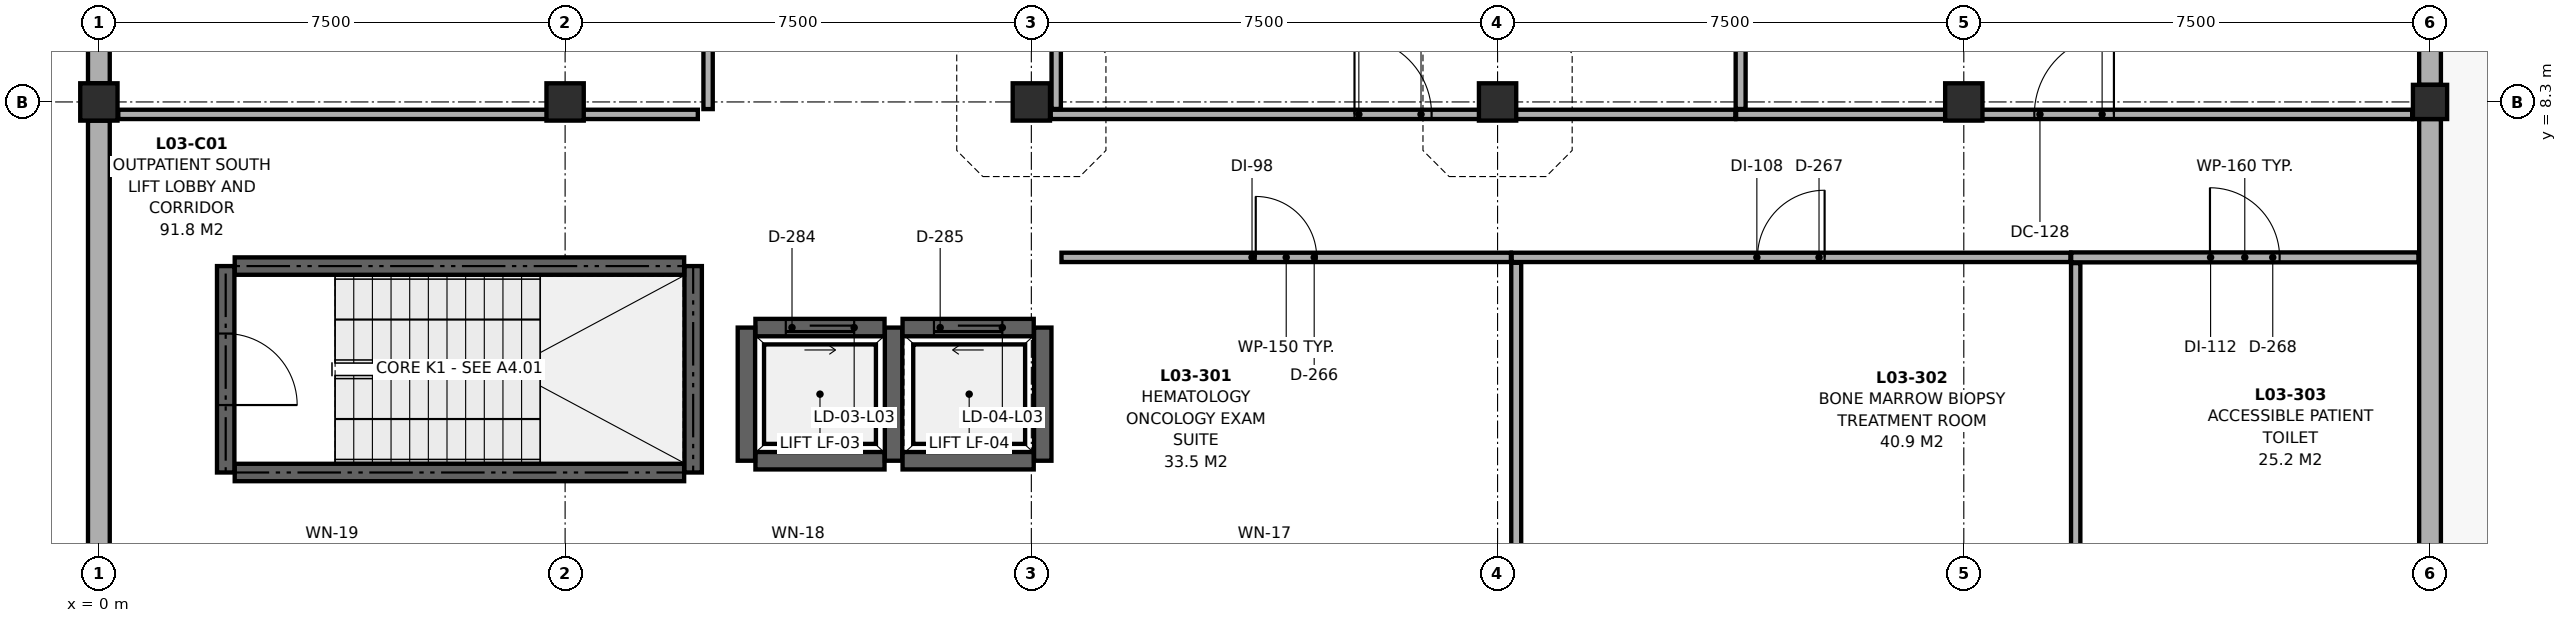
"""IFC4 building model, lengths in metres.
Left out: names, types, materials, properties, quantities, classifications, styles, units other than length and angle.
Written with IfcOpenShell. Run it as: python <this file> out.ifc"""

import sys

from ifc_helpers import new_model, si_unit, direction, frame, frame_2d, origin, origin_2d, place, context, subcontext, project, spatial, rectangle, extrude, element, fill, save


model = new_model("IFC4")
c1 = context("Model", 3, precision=1e-05, world=origin(), true_north=direction((0.0, 1.0)))
c2 = subcontext(c1, "Body", "Model", "MODEL_VIEW")
j1 = project(units=[si_unit("LENGTHUNIT", "METRE"), si_unit("PLANEANGLEUNIT", "RADIAN")], contexts=[c1])
p1 = place(None, origin())
s1 = spatial("IfcSite", under=j1, at=p1, CompositionType="ELEMENT")
p2 = place(p1, origin())
s2 = spatial("IfcBuilding", under=s1, at=p2, CompositionType="ELEMENT")
p3 = place(p2, frame((0.0, 0.0, 13.5)))
s3 = spatial("IfcBuildingStorey", under=s2, at=p3, CompositionType="ELEMENT", Elevation=13.5)
for number, where, z_axis, x_axis in (
    (1, (0.0, 8.3, 0.0), (0.0, 0.0, 1.0), (1.0, 0.0, 0.0)),
    (2, (7.5, 8.3, 0.0), (0.0, 0.0, 1.0), (1.0, 0.0, 0.0)),
    (3, (15.0, 8.3, 0.0), (0.0, 0.0, 1.0), (1.0, 0.0, 0.0)),
    (4, (22.5, 8.3, 0.0), (0.0, 0.0, 1.0), (1.0, 0.0, 0.0)),
    (5, (30.0, 8.3, 0.0), (0.0, 0.0, 1.0), (1.0, 0.0, 0.0)),
):
    element("IfcColumn", number, at=place(p3, frame(where, z_axis=z_axis, x_axis=x_axis)), inside=s3, PredefinedType="COLUMN", context=c2, shape_type="SweptSolid", body=[
        extrude(rectangle(XDim=0.6, YDim=0.6, at=origin_2d()), origin(), (0.0, 0.0, 1.0), 3.72),
    ])
p4 = place(p3, frame((37.5, 8.3, 0.0), z_axis=(0.0, 0.0, 1.0), x_axis=(1.0, 0.0, 0.0)))
e6 = element("IfcColumn", 6, at=p4, inside=s3, PredefinedType="COLUMN", context=c2, shape_type="SweptSolid", body=[
    extrude(rectangle(XDim=0.55, YDim=0.55, at=origin_2d()), origin(), (0.0, 0.0, 1.0), 3.75),
])
p5 = place(p3, frame((37.5, 15.525, 0.0), z_axis=(0.0, 0.0, 1.0), x_axis=(0.0, -1.0, 0.0)))
e7 = element("IfcWall", 7, at=p5, inside=s3, PredefinedType="SOLIDWALL", context=c2, shape_type="SweptSolid", body=[
    extrude(rectangle(XDim=6.95, YDim=0.35, at=frame_2d((3.475, 0.0))), origin(), (0.0, 0.0, 1.0), 3.005),
])
p6 = place(p5, frame((2.925, 0.0, 0.0)))
e8 = element("IfcOpeningElement", 8, at=p6, cuts=e7, PredefinedType="OPENING", context=c2, shape_type="SweptSolid", body=[
    extrude(rectangle(XDim=1.1, YDim=2.15, at=frame_2d((0.55, 1.075))), frame((0.0, 0.187, 0.0), z_axis=(0.0, -1.0, 0.0), x_axis=(1.0, 0.0, 0.0)), (0.0, 0.0, 1.0), 0.374),
])
p7 = place(p3, frame((37.5, 8.025, 0.0), z_axis=(0.0, 0.0, 1.0), x_axis=(0.0, -1.0, 0.0)))
e9 = element("IfcWall", 9, at=p7, inside=s3, PredefinedType="SOLIDWALL", context=c2, shape_type="SweptSolid", body=[
    extrude(rectangle(XDim=6.95, YDim=0.35, at=frame_2d((3.475, 0.0))), origin(), (0.0, 0.0, 1.0), 3.005),
])
p8 = place(p3, frame((0.0, 1.1, 0.0), z_axis=(0.0, 0.0, 1.0), x_axis=(0.0, 1.0, 0.0)))
e10 = element("IfcWall", 10, at=p8, inside=s3, PredefinedType="SOLIDWALL", context=c2, shape_type="SweptSolid", body=[
    extrude(rectangle(XDim=6.9, YDim=0.35, at=frame_2d((3.45, 0.0))), origin(), (0.0, 0.0, 1.0), 3.005),
])
p9 = place(p3, frame((0.0, 8.6, 0.0), z_axis=(0.0, 0.0, 1.0), x_axis=(0.0, 1.0, 0.0)))
e11 = element("IfcWall", 11, at=p9, inside=s3, PredefinedType="SOLIDWALL", context=c2, shape_type="SweptSolid", body=[
    extrude(rectangle(XDim=6.9, YDim=0.35, at=frame_2d((3.45, 0.0))), origin(), (0.0, 0.0, 1.0), 2.805),
])
p10 = place(p3, frame((2.185, 2.34, 0.0), z_axis=(0.0, 0.0, 1.0), x_axis=(1.0, 0.0, 0.0)))
e12 = element("IfcWall", 12, at=p10, inside=s3, PredefinedType="SHEAR", context=c2, shape_type="SweptSolid", body=[
    extrude(rectangle(XDim=7.23, YDim=0.28, at=frame_2d((3.615, 0.0))), origin(), (0.0, 0.0, 1.0), 3.72),
])
p11 = place(p3, frame((9.56, 2.34, 0.0), z_axis=(0.0, 0.0, 1.0), x_axis=(0.0, 1.0, 0.0)))
e13 = element("IfcWall", 13, at=p11, inside=s3, PredefinedType="SHEAR", context=c2, shape_type="SweptSolid", body=[
    extrude(rectangle(XDim=3.32, YDim=0.28, at=frame_2d((1.66, 0.0))), origin(), (0.0, 0.0, 1.0), 3.72),
])
p12 = place(p3, frame((9.415, 5.66, 0.0), z_axis=(0.0, 0.0, 1.0), x_axis=(-1.0, 0.0, 0.0)))
e14 = element("IfcWall", 14, at=p12, inside=s3, PredefinedType="SHEAR", context=c2, shape_type="SweptSolid", body=[
    extrude(rectangle(XDim=7.23, YDim=0.28, at=frame_2d((3.615, 0.0))), origin(), (0.0, 0.0, 1.0), 3.72),
])
p13 = place(p3, frame((2.04, 5.66, 0.0), z_axis=(0.0, 0.0, 1.0), x_axis=(0.0, -1.0, 0.0)))
e15 = element("IfcWall", 15, at=p13, inside=s3, PredefinedType="SHEAR", context=c2, shape_type="SweptSolid", body=[
    extrude(rectangle(XDim=3.32, YDim=0.28, at=frame_2d((1.66, 0.0))), origin(), (0.0, 0.0, 1.0), 3.72),
])
p14 = place(p13, frame((1.085, 0.0, 0.0)))
e16 = element("IfcOpeningElement", 16, at=p14, cuts=e15, PredefinedType="OPENING", context=c2, shape_type="SweptSolid", body=[
    extrude(rectangle(XDim=1.15, YDim=2.15, at=frame_2d((0.575, 1.075))), frame((0.0, 0.152, 0.0), z_axis=(0.0, -1.0, 0.0), x_axis=(1.0, 0.0, 0.0)), (0.0, 0.0, 1.0), 0.304),
])
p15 = place(p3, frame((10.562, 2.529, 0.0), z_axis=(0.0, 0.0, 1.0), x_axis=(1.0, 0.0, 0.0)))
e17 = element("IfcWall", 17, at=p15, inside=s3, PredefinedType="SHEAR", context=c2, shape_type="SweptSolid", body=[
    extrude(rectangle(XDim=2.077, YDim=0.28, at=frame_2d((1.039, 0.0))), origin(), (0.0, 0.0, 1.0), 3.72),
])
p16 = place(p3, frame((12.783, 2.529, 0.0), z_axis=(0.0, 0.0, 1.0), x_axis=(0.0, 1.0, 0.0)))
e18 = element("IfcWall", 18, at=p16, inside=s3, PredefinedType="SHEAR", context=c2, shape_type="SweptSolid", body=[
    extrude(rectangle(XDim=2.141, YDim=0.28, at=frame_2d((1.071, 0.0))), origin(), (0.0, 0.0, 1.0), 3.72),
])
p17 = place(p3, frame((12.638, 4.671, 0.0), z_axis=(0.0, 0.0, 1.0), x_axis=(-1.0, 0.0, 0.0)))
e19 = element("IfcWall", 19, at=p17, inside=s3, PredefinedType="SHEAR", context=c2, shape_type="SweptSolid", body=[
    extrude(rectangle(XDim=2.077, YDim=0.28, at=frame_2d((1.039, 0.0))), origin(), (0.0, 0.0, 1.0), 3.72),
])
p18 = place(p17, frame((0.489, 0.0, 0.0)))
e20 = element("IfcOpeningElement", 20, at=p18, cuts=e19, PredefinedType="OPENING", context=c2, shape_type="SweptSolid", body=[
    extrude(rectangle(XDim=1.1, YDim=2.15, at=frame_2d((0.55, 1.075))), frame((0.0, 0.152, 0.0), z_axis=(0.0, -1.0, 0.0), x_axis=(1.0, 0.0, 0.0)), (0.0, 0.0, 1.0), 0.304),
])
p19 = place(p3, frame((10.417, 4.671, 0.0), z_axis=(0.0, 0.0, 1.0), x_axis=(0.0, -1.0, 0.0)))
e21 = element("IfcWall", 21, at=p19, inside=s3, PredefinedType="SHEAR", context=c2, shape_type="SweptSolid", body=[
    extrude(rectangle(XDim=2.141, YDim=0.28, at=frame_2d((1.071, 0.0))), origin(), (0.0, 0.0, 1.0), 3.72),
])
p20 = place(p3, frame((12.928, 2.529, 0.0), z_axis=(0.0, 0.0, 1.0), x_axis=(1.0, 0.0, 0.0)))
e22 = element("IfcWall", 22, at=p20, inside=s3, PredefinedType="SHEAR", context=c2, shape_type="SweptSolid", body=[
    extrude(rectangle(XDim=2.11, YDim=0.28, at=frame_2d((1.055, 0.0))), origin(), (0.0, 0.0, 1.0), 3.72),
])
p21 = place(p3, frame((15.184, 2.529, 0.0), z_axis=(0.0, 0.0, 1.0), x_axis=(0.0, 1.0, 0.0)))
e23 = element("IfcWall", 23, at=p21, inside=s3, PredefinedType="SHEAR", context=c2, shape_type="SweptSolid", body=[
    extrude(rectangle(XDim=2.141, YDim=0.28, at=frame_2d((1.071, 0.0))), origin(), (0.0, 0.0, 1.0), 3.72),
])
p22 = place(p3, frame((15.039, 4.671, 0.0), z_axis=(0.0, 0.0, 1.0), x_axis=(-1.0, 0.0, 0.0)))
e24 = element("IfcWall", 24, at=p22, inside=s3, PredefinedType="SHEAR", context=c2, shape_type="SweptSolid", body=[
    extrude(rectangle(XDim=2.11, YDim=0.28, at=frame_2d((1.055, 0.0))), origin(), (0.0, 0.0, 1.0), 3.72),
])
p23 = place(p22, frame((0.505, 0.0, 0.0)))
e25 = element("IfcOpeningElement", 25, at=p23, cuts=e24, PredefinedType="OPENING", context=c2, shape_type="SweptSolid", body=[
    extrude(rectangle(XDim=1.1, YDim=2.15, at=frame_2d((0.55, 1.075))), frame((0.0, 0.152, 0.0), z_axis=(0.0, -1.0, 0.0), x_axis=(1.0, 0.0, 0.0)), (0.0, 0.0, 1.0), 0.304),
])
p24 = place(p3, frame((15.485, 5.8, 0.0), z_axis=(0.0, 0.0, 1.0), x_axis=(1.0, 0.0, 0.0)))
e26 = element("IfcWall", 26, at=p24, inside=s3, PredefinedType="PARTITIONING", context=c2, shape_type="SweptSolid", body=[
    extrude(rectangle(XDim=7.23, YDim=0.15, at=frame_2d((3.615, 0.0))), origin(), (0.0, 0.0, 1.0), 2.805),
])
p25 = place(p24, frame((3.125, 0.0, 0.0)))
e27 = element("IfcOpeningElement", 27, at=p25, cuts=e26, PredefinedType="OPENING", context=c2, shape_type="SweptSolid", body=[
    extrude(rectangle(XDim=0.98, YDim=2.12, at=frame_2d((0.49, 1.06))), frame((0.0, 0.087, 0.0), z_axis=(0.0, -1.0, 0.0), x_axis=(1.0, 0.0, 0.0)), (0.0, 0.0, 1.0), 0.174),
])
p26 = place(p3, frame((22.727, 5.8, 0.0), z_axis=(0.0, 0.0, 1.0), x_axis=(1.0, 0.0, 0.0)))
e28 = element("IfcWall", 28, at=p26, inside=s3, PredefinedType="PARTITIONING", context=c2, shape_type="SweptSolid", body=[
    extrude(rectangle(XDim=8.988, YDim=0.15, at=frame_2d((4.494, 0.0))), origin(), (0.0, 0.0, 1.0), 2.805),
])
p27 = place(p26, frame((3.954, 0.0, 0.0)))
e29 = element("IfcOpeningElement", 29, at=p27, cuts=e28, PredefinedType="OPENING", context=c2, shape_type="SweptSolid", body=[
    extrude(rectangle(XDim=1.08, YDim=2.18, at=frame_2d((0.54, 1.09))), frame((0.0, 0.087, 0.0), z_axis=(0.0, -1.0, 0.0), x_axis=(1.0, 0.0, 0.0)), (0.0, 0.0, 1.0), 0.174),
])
p28 = place(p3, frame((31.727, 5.8, 0.0), z_axis=(0.0, 0.0, 1.0), x_axis=(1.0, 0.0, 0.0)))
e30 = element("IfcWall", 30, at=p28, inside=s3, PredefinedType="PARTITIONING", context=c2, shape_type="SweptSolid", body=[
    extrude(rectangle(XDim=5.586, YDim=0.16, at=frame_2d((2.793, 0.0))), origin(), (0.0, 0.0, 1.0), 3.085),
])
p29 = place(p28, frame((2.233, 0.0, 0.0)))
e31 = element("IfcOpeningElement", 31, at=p29, cuts=e30, PredefinedType="OPENING", context=c2, shape_type="SweptSolid", body=[
    extrude(rectangle(XDim=1.12, YDim=2.2, at=frame_2d((0.56, 1.1))), frame((0.0, 0.092, 0.0), z_axis=(0.0, -1.0, 0.0), x_axis=(1.0, 0.0, 0.0)), (0.0, 0.0, 1.0), 0.184),
])
p30 = place(p3, frame((15.312, 8.1, 0.0), z_axis=(0.0, 0.0, 1.0), x_axis=(1.0, 0.0, 0.0)))
e32 = element("IfcWall", 32, at=p30, inside=s3, PredefinedType="PARTITIONING", context=c2, shape_type="SweptSolid", body=[
    extrude(rectangle(XDim=11.013, YDim=0.15, at=frame_2d((5.506, 0.0))), origin(), (0.0, 0.0, 1.0), 2.805),
])
p31 = place(p30, frame((4.886, 0.0, 0.0)))
e33 = element("IfcOpeningElement", 33, at=p31, cuts=e32, PredefinedType="OPENING", context=c2, shape_type="SweptSolid", body=[
    extrude(rectangle(XDim=1.24, YDim=2.2, at=frame_2d((0.62, 1.1))), frame((0.0, 0.087, 0.0), z_axis=(0.0, -1.0, 0.0), x_axis=(1.0, 0.0, 0.0)), (0.0, 0.0, 1.0), 0.174),
])
p32 = place(p3, frame((26.337, 8.1, 0.0), z_axis=(0.0, 0.0, 1.0), x_axis=(1.0, 0.0, 0.0)))
e34 = element("IfcWall", 34, at=p32, inside=s3, PredefinedType="PARTITIONING", context=c2, shape_type="SweptSolid", body=[
    extrude(rectangle(XDim=10.876, YDim=0.15, at=frame_2d((5.438, 0.0))), origin(), (0.0, 0.0, 1.0), 2.805),
])
p33 = place(p32, frame((4.798, 0.0, 0.0)))
e35 = element("IfcOpeningElement", 35, at=p33, cuts=e34, PredefinedType="OPENING", context=c2, shape_type="SweptSolid", body=[
    extrude(rectangle(XDim=1.28, YDim=2.22, at=frame_2d((0.64, 1.11))), frame((0.0, 0.087, 0.0), z_axis=(0.0, -1.0, 0.0), x_axis=(1.0, 0.0, 0.0)), (0.0, 0.0, 1.0), 0.174),
])
p34 = place(p3, frame((9.8, 8.185, 0.0), z_axis=(0.0, 0.0, 1.0), x_axis=(0.0, 1.0, 0.0)))
e36 = element("IfcWall", 36, at=p34, inside=s3, PredefinedType="PARTITIONING", context=c2, shape_type="SweptSolid", body=[
    extrude(rectangle(XDim=6.93, YDim=0.15, at=frame_2d((3.465, 0.0))), origin(), (0.0, 0.0, 1.0), 2.805),
])
p35 = place(p34, frame((2.715, 0.0, 0.0)))
e37 = element("IfcOpeningElement", 37, at=p35, cuts=e36, PredefinedType="OPENING", context=c2, shape_type="SweptSolid", body=[
    extrude(rectangle(XDim=1.5, YDim=2.28, at=frame_2d((0.75, 1.14))), frame((0.0, 0.087, 0.0), z_axis=(0.0, -1.0, 0.0), x_axis=(1.0, 0.0, 0.0)), (0.0, 0.0, 1.0), 0.174),
])
p36 = place(p3, frame((22.8, 1.112, 0.0), z_axis=(0.0, 0.0, 1.0), x_axis=(0.0, 1.0, 0.0)))
e38 = element("IfcWall", 38, at=p36, inside=s3, PredefinedType="PARTITIONING", context=c2, shape_type="SweptSolid", body=[
    extrude(rectangle(XDim=4.601, YDim=0.16, at=frame_2d((2.3, 0.0))), origin(), (0.0, 0.0, 1.0), 2.805),
])
p37 = place(p3, frame((31.8, 0.987, 0.0), z_axis=(0.0, 0.0, 1.0), x_axis=(0.0, 1.0, 0.0)))
e39 = element("IfcWall", 39, at=p37, inside=s3, PredefinedType="PARTITIONING", context=c2, shape_type="SweptSolid", body=[
    extrude(rectangle(XDim=4.721, YDim=0.15, at=frame_2d((2.36, 0.0))), origin(), (0.0, 0.0, 1.0), 3.055),
])
p38 = place(p3, frame((15.4, 8.187, 0.0), z_axis=(0.0, 0.0, 1.0), x_axis=(0.0, 1.0, 0.0)))
e40 = element("IfcWall", 40, at=p38, inside=s3, PredefinedType="PARTITIONING", context=c2, shape_type="SweptSolid", body=[
    extrude(rectangle(XDim=7.426, YDim=0.15, at=frame_2d((3.713, 0.0))), origin(), (0.0, 0.0, 1.0), 2.805),
])
p39 = place(p3, frame((26.41, 8.187, 0.0), z_axis=(0.0, 0.0, 1.0), x_axis=(0.0, 1.0, 0.0)))
e41 = element("IfcWall", 41, at=p39, inside=s3, PredefinedType="PARTITIONING", context=c2, shape_type="SweptSolid", body=[
    extrude(rectangle(XDim=7.426, YDim=0.16, at=frame_2d((3.713, 0.0))), origin(), (0.0, 0.0, 1.0), 2.805),
])
p40 = place(p3, frame((0.312, 8.1, 0.0), z_axis=(0.0, 0.0, 1.0), x_axis=(1.0, 0.0, 0.0)))
e42 = element("IfcWall", 42, at=p40, inside=s3, PredefinedType="PARTITIONING", context=c2, shape_type="SweptSolid", body=[
    extrude(rectangle(XDim=9.323, YDim=0.15, at=frame_2d((4.662, 0.0))), origin(), (0.0, 0.0, 1.0), 2.805),
])
p41 = place(p14, origin())
e43 = element("IfcDoor", 43, at=p41, inside=s3, OperationType="SINGLE_SWING_RIGHT", PredefinedType="DOOR", context=c2, shape_type="SweptSolid", body=[
    extrude(rectangle(XDim=1.15, YDim=2.15, at=frame_2d((0.575, 1.075))), frame((0.0, 0.025, 0.0), z_axis=(0.0, -1.0, 0.0), x_axis=(1.0, 0.0, 0.0)), (0.0, 0.0, 1.0), 0.05),
])
fill(e16, e43)
p42 = place(p18, origin())
e44 = element("IfcDoor", 44, at=p42, inside=s3, OperationType="SLIDING_TO_LEFT", PredefinedType="DOOR", context=c2, shape_type="SweptSolid", body=[
    extrude(rectangle(XDim=1.1, YDim=2.15, at=frame_2d((0.55, 1.075))), frame((0.0, 0.025, 0.0), z_axis=(0.0, -1.0, 0.0), x_axis=(1.0, 0.0, 0.0)), (0.0, 0.0, 1.0), 0.05),
])
fill(e20, e44)
p43 = place(p23, origin())
e45 = element("IfcDoor", 45, at=p43, inside=s3, OperationType="SLIDING_TO_RIGHT", PredefinedType="DOOR", context=c2, shape_type="SweptSolid", body=[
    extrude(rectangle(XDim=1.1, YDim=2.15, at=frame_2d((0.55, 1.075))), frame((0.0, 0.025, 0.0), z_axis=(0.0, -1.0, 0.0), x_axis=(1.0, 0.0, 0.0)), (0.0, 0.0, 1.0), 0.05),
])
fill(e25, e45)
p44 = place(p25, origin())
e46 = element("IfcDoor", 46, at=p44, inside=s3, OperationType="SINGLE_SWING_LEFT", PredefinedType="DOOR", context=c2, shape_type="SweptSolid", body=[
    extrude(rectangle(XDim=0.98, YDim=2.12, at=frame_2d((0.49, 1.06))), frame((0.0, 0.025, 0.0), z_axis=(0.0, -1.0, 0.0), x_axis=(1.0, 0.0, 0.0)), (0.0, 0.0, 1.0), 0.05),
])
fill(e27, e46)
p45 = place(p27, origin())
e47 = element("IfcDoor", 47, at=p45, inside=s3, OperationType="SINGLE_SWING_RIGHT", PredefinedType="DOOR", context=c2, shape_type="SweptSolid", body=[
    extrude(rectangle(XDim=1.08, YDim=2.18, at=frame_2d((0.54, 1.09))), frame((0.0, 0.025, 0.0), z_axis=(0.0, -1.0, 0.0), x_axis=(1.0, 0.0, 0.0)), (0.0, 0.0, 1.0), 0.05),
])
fill(e29, e47)
p46 = place(p29, origin())
e48 = element("IfcDoor", 48, at=p46, inside=s3, OperationType="SINGLE_SWING_LEFT", PredefinedType="DOOR", context=c2, shape_type="SweptSolid", body=[
    extrude(rectangle(XDim=1.12, YDim=2.2, at=frame_2d((0.56, 1.1))), frame((0.0, 0.025, 0.0), z_axis=(0.0, -1.0, 0.0), x_axis=(1.0, 0.0, 0.0)), (0.0, 0.0, 1.0), 0.05),
])
fill(e31, e48)
p47 = place(p31, origin())
e49 = element("IfcDoor", 49, at=p47, inside=s3, OperationType="SINGLE_SWING_LEFT", PredefinedType="DOOR", context=c2, shape_type="SweptSolid", body=[
    extrude(rectangle(XDim=1.24, YDim=2.2, at=frame_2d((0.62, 1.1))), frame((0.0, 0.025, 0.0), z_axis=(0.0, -1.0, 0.0), x_axis=(1.0, 0.0, 0.0)), (0.0, 0.0, 1.0), 0.05),
])
fill(e33, e49)
p48 = place(p33, origin())
e50 = element("IfcDoor", 50, at=p48, inside=s3, OperationType="SINGLE_SWING_RIGHT", PredefinedType="DOOR", context=c2, shape_type="SweptSolid", body=[
    extrude(rectangle(XDim=1.28, YDim=2.22, at=frame_2d((0.64, 1.11))), frame((0.0, 0.025, 0.0), z_axis=(0.0, -1.0, 0.0), x_axis=(1.0, 0.0, 0.0)), (0.0, 0.0, 1.0), 0.05),
])
fill(e35, e50)
save(model, sys.argv[1])
